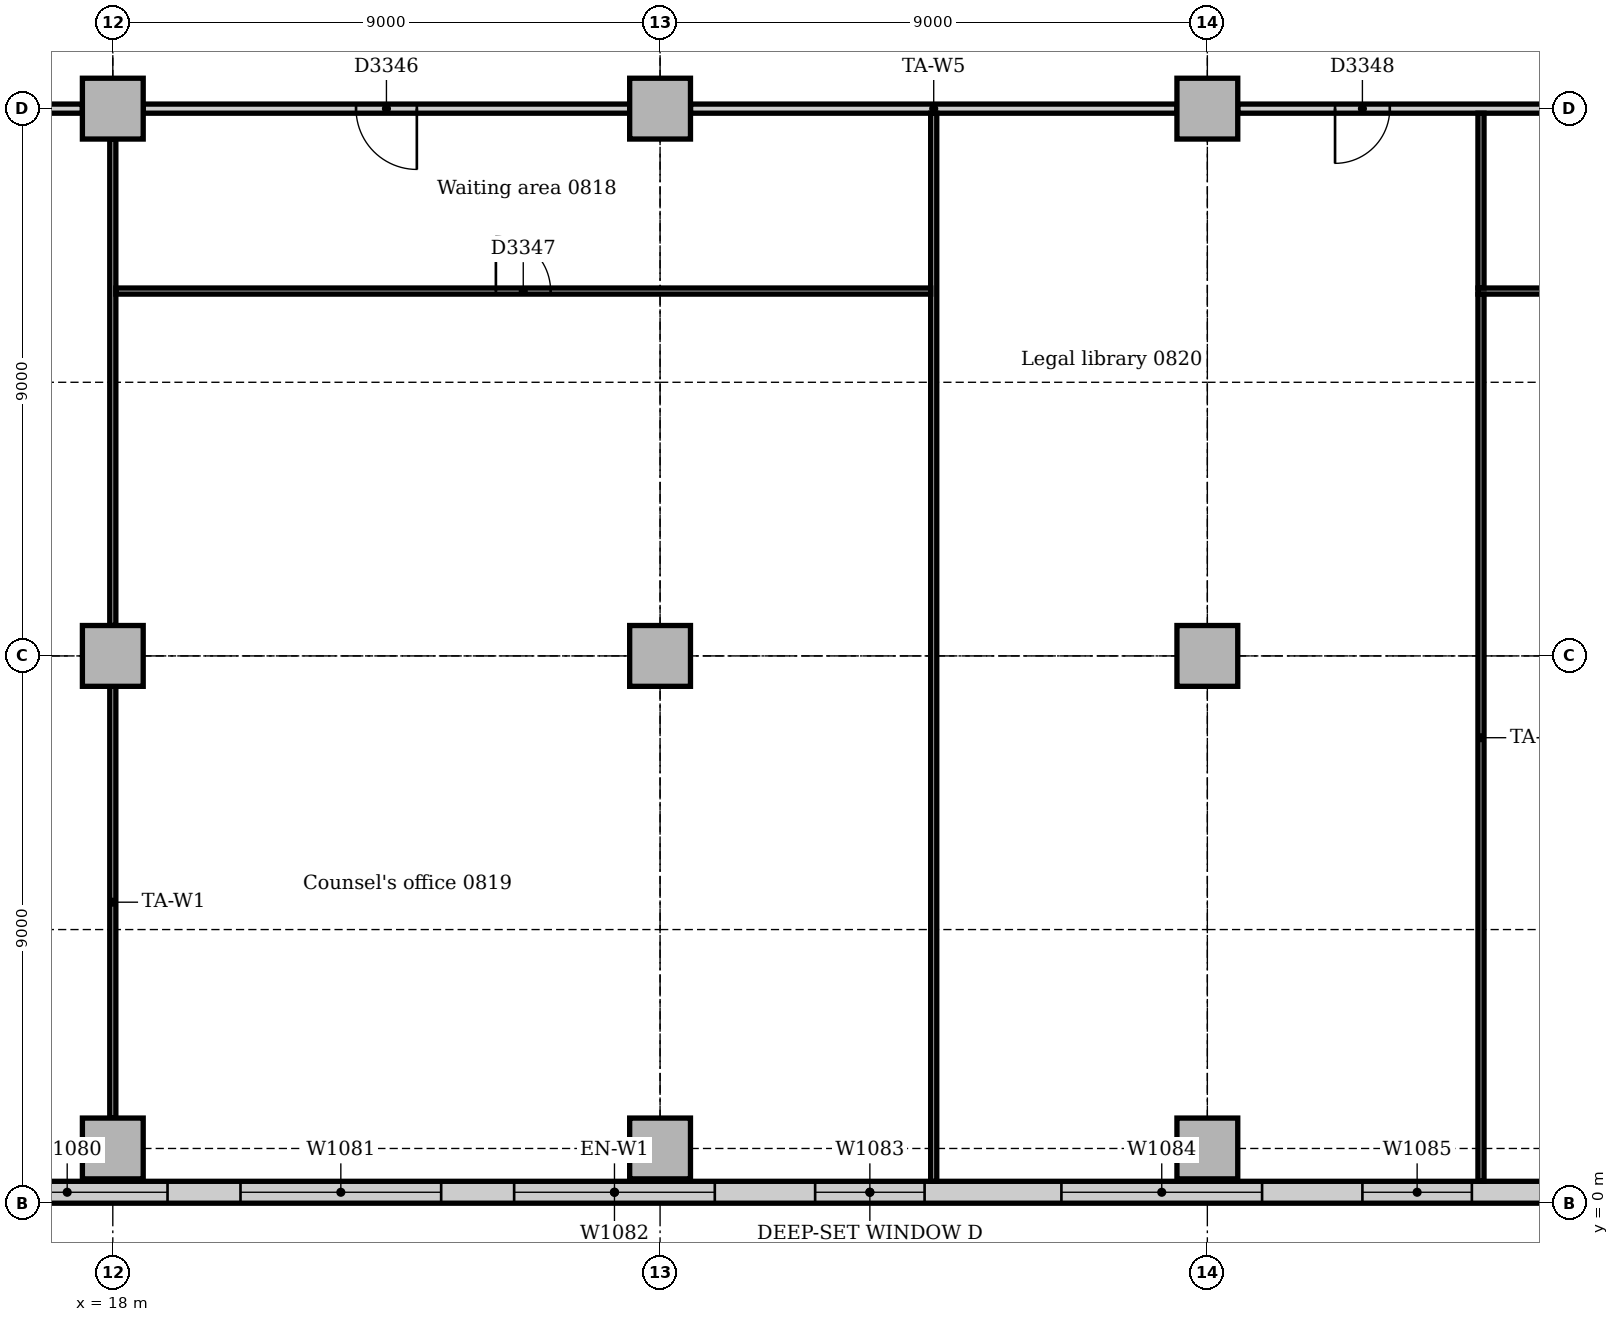
"""IFC4 building model, lengths in metres.
Left out: names, types, materials, properties, quantities, classifications, styles, units other than length and angle.
Written with IfcOpenShell. Run it as: python <this file> out.ifc"""

import sys

from ifc_helpers import new_model, si_unit, direction, frame, frame_2d, origin, origin_2d, place, context, subcontext, project, spatial, rectangle, extrude, element, fill, save


model = new_model("IFC4")
c1 = context("Model", 3, precision=1e-05, world=origin(), true_north=direction((0.0, 1.0)))
c2 = subcontext(c1, "Body", "Model", "MODEL_VIEW")
j1 = project(units=[si_unit("LENGTHUNIT", "METRE"), si_unit("PLANEANGLEUNIT", "RADIAN")], contexts=[c1])
p1 = place(None, origin())
s1 = spatial("IfcSite", under=j1, at=p1, CompositionType="ELEMENT")
p2 = place(p1, origin())
s2 = spatial("IfcBuilding", under=s1, at=p2, CompositionType="ELEMENT")
p3 = place(p2, frame((0.0, 0.0, 38.0)))
s3 = spatial("IfcBuildingStorey", under=s2, at=p3, CompositionType="ELEMENT", Elevation=38.0)
for number, where, z_axis, x_axis in (
    (1, (18.0, 0.9, 0.0), (0.0, 0.0, 1.0), (1.0, 0.0, 0.0)),
    (2, (27.0, 0.9, 0.0), (0.0, 0.0, 1.0), (1.0, 0.0, 0.0)),
    (3, (36.0, 0.9, 0.0), (0.0, 0.0, 1.0), (1.0, 0.0, 0.0)),
    (4, (18.0, 9.0, 0.0), (0.0, 0.0, 1.0), (1.0, 0.0, 0.0)),
    (5, (18.0, 18.0, 0.0), (0.0, 0.0, 1.0), (1.0, 0.0, 0.0)),
    (6, (27.0, 9.0, 0.0), (0.0, 0.0, 1.0), (1.0, 0.0, 0.0)),
    (7, (27.0, 18.0, 0.0), (0.0, 0.0, 1.0), (1.0, 0.0, 0.0)),
    (8, (36.0, 9.0, 0.0), (0.0, 0.0, 1.0), (1.0, 0.0, 0.0)),
    (9, (36.0, 18.0, 0.0), (0.0, 0.0, 1.0), (1.0, 0.0, 0.0)),
):
    element("IfcColumn", number, at=place(p3, frame(where, z_axis=z_axis, x_axis=x_axis)), inside=s3, PredefinedType="COLUMN", context=c2, shape_type="SweptSolid", body=[
        extrude(rectangle(XDim=1.0, YDim=1.0, at=origin_2d()), origin(), (0.0, 0.0, 1.0), 3.85),
    ])
p4 = place(p3, frame((4.243, 0.18, 0.0), z_axis=(0.0, 0.0, 1.0), x_axis=(1.0, 0.0, 0.0)))
e10 = element("IfcWall", 10, at=p4, inside=s3, PredefinedType="STANDARD", context=c2, shape_type="SweptSolid", body=[
    extrude(rectangle(XDim=44.015, YDim=0.36, at=frame_2d((22.007, 0.0))), origin(), (0.0, 0.0, 1.0), 3.85),
])
p5 = place(p4, frame((2.357, 0.0, 0.9)))
e11 = element("IfcOpeningElement", 11, at=p5, cuts=e10, PredefinedType="OPENING", context=c2, shape_type="SweptSolid", body=[
    extrude(rectangle(XDim=3.3, YDim=1.6, at=frame_2d((1.65, 0.8))), frame((0.0, 0.19, 0.0), z_axis=(0.0, -1.0, 0.0), x_axis=(1.0, 0.0, 0.0)), (0.0, 0.0, 1.0), 0.38),
])
p6 = place(p4, frame((6.857, 0.0, 0.9)))
e12 = element("IfcOpeningElement", 12, at=p6, cuts=e10, PredefinedType="OPENING", context=c2, shape_type="SweptSolid", body=[
    extrude(rectangle(XDim=3.3, YDim=1.6, at=frame_2d((1.65, 0.8))), frame((0.0, 0.19, 0.0), z_axis=(0.0, -1.0, 0.0), x_axis=(1.0, 0.0, 0.0)), (0.0, 0.0, 1.0), 0.38),
])
p7 = place(p4, frame((11.357, 0.0, 0.9)))
e13 = element("IfcOpeningElement", 13, at=p7, cuts=e10, PredefinedType="OPENING", context=c2, shape_type="SweptSolid", body=[
    extrude(rectangle(XDim=3.3, YDim=1.6, at=frame_2d((1.65, 0.8))), frame((0.0, 0.19, 0.0), z_axis=(0.0, -1.0, 0.0), x_axis=(1.0, 0.0, 0.0)), (0.0, 0.0, 1.0), 0.38),
])
p8 = place(p4, frame((15.857, 0.0, 0.9)))
e14 = element("IfcOpeningElement", 14, at=p8, cuts=e10, PredefinedType="OPENING", context=c2, shape_type="SweptSolid", body=[
    extrude(rectangle(XDim=3.3, YDim=1.6, at=frame_2d((1.65, 0.8))), frame((0.0, 0.19, 0.0), z_axis=(0.0, -1.0, 0.0), x_axis=(1.0, 0.0, 0.0)), (0.0, 0.0, 1.0), 0.38),
])
p9 = place(p4, frame((20.357, 0.0, 0.9)))
e15 = element("IfcOpeningElement", 15, at=p9, cuts=e10, PredefinedType="OPENING", context=c2, shape_type="SweptSolid", body=[
    extrude(rectangle(XDim=3.3, YDim=1.6, at=frame_2d((1.65, 0.8))), frame((0.0, 0.19, 0.0), z_axis=(0.0, -1.0, 0.0), x_axis=(1.0, 0.0, 0.0)), (0.0, 0.0, 1.0), 0.38),
])
p10 = place(p4, frame((25.307, 0.0, 0.9)))
e16 = element("IfcOpeningElement", 16, at=p10, cuts=e10, PredefinedType="OPENING", context=c2, shape_type="SweptSolid", body=[
    extrude(rectangle(XDim=1.8, YDim=1.6, at=frame_2d((0.9, 0.8))), frame((0.0, 0.19, 0.0), z_axis=(0.0, -1.0, 0.0), x_axis=(1.0, 0.0, 0.0)), (0.0, 0.0, 1.0), 0.38),
])
p11 = place(p4, frame((29.357, 0.0, 0.9)))
e17 = element("IfcOpeningElement", 17, at=p11, cuts=e10, PredefinedType="OPENING", context=c2, shape_type="SweptSolid", body=[
    extrude(rectangle(XDim=3.3, YDim=1.6, at=frame_2d((1.65, 0.8))), frame((0.0, 0.19, 0.0), z_axis=(0.0, -1.0, 0.0), x_axis=(1.0, 0.0, 0.0)), (0.0, 0.0, 1.0), 0.38),
])
p12 = place(p4, frame((34.307, 0.0, 0.9)))
e18 = element("IfcOpeningElement", 18, at=p12, cuts=e10, PredefinedType="OPENING", context=c2, shape_type="SweptSolid", body=[
    extrude(rectangle(XDim=1.8, YDim=1.6, at=frame_2d((0.9, 0.8))), frame((0.0, 0.19, 0.0), z_axis=(0.0, -1.0, 0.0), x_axis=(1.0, 0.0, 0.0)), (0.0, 0.0, 1.0), 0.38),
])
p13 = place(p4, frame((38.357, 0.0, 0.9)))
e19 = element("IfcOpeningElement", 19, at=p13, cuts=e10, PredefinedType="OPENING", context=c2, shape_type="SweptSolid", body=[
    extrude(rectangle(XDim=3.3, YDim=1.6, at=frame_2d((1.65, 0.8))), frame((0.0, 0.19, 0.0), z_axis=(0.0, -1.0, 0.0), x_axis=(1.0, 0.0, 0.0)), (0.0, 0.0, 1.0), 0.38),
])
p14 = place(p3, frame((36.5, 18.0, 0.0), z_axis=(0.0, 0.0, 1.0), x_axis=(1.0, 0.0, 0.0)))
e20 = element("IfcWall", 20, at=p14, inside=s3, PredefinedType="PARTITIONING", context=c2, shape_type="SweptSolid", body=[
    extrude(rectangle(XDim=8.0, YDim=0.15, at=frame_2d((4.0, 0.0))), origin(), (0.0, 0.0, 1.0), 3.15),
])
p15 = place(p14, frame((1.6, 0.0, 0.0)))
e21 = element("IfcOpeningElement", 21, at=p15, cuts=e20, PredefinedType="OPENING", context=c2, shape_type="SweptSolid", body=[
    extrude(rectangle(XDim=0.9, YDim=2.1, at=frame_2d((0.45, 1.05))), frame((0.0, 0.085, 0.0), z_axis=(0.0, -1.0, 0.0), x_axis=(1.0, 0.0, 0.0)), (0.0, 0.0, 1.0), 0.17),
])
p16 = place(p3, frame((27.5, 18.0, 0.0), z_axis=(0.0, 0.0, 1.0), x_axis=(1.0, 0.0, 0.0)))
e22 = element("IfcWall", 22, at=p16, inside=s3, PredefinedType="PARTITIONING", context=c2, shape_type="SweptSolid", body=[
    extrude(rectangle(XDim=8.0, YDim=0.15, at=frame_2d((4.0, 0.0))), origin(), (0.0, 0.0, 1.0), 3.15),
])
p17 = place(p3, frame((18.5, 18.0, 0.0), z_axis=(0.0, 0.0, 1.0), x_axis=(1.0, 0.0, 0.0)))
e23 = element("IfcWall", 23, at=p17, inside=s3, PredefinedType="PARTITIONING", context=c2, shape_type="SweptSolid", body=[
    extrude(rectangle(XDim=8.0, YDim=0.15, at=frame_2d((4.0, 0.0))), origin(), (0.0, 0.0, 1.0), 3.15),
])
p18 = place(p17, frame((3.5, 0.0, 0.0)))
e24 = element("IfcOpeningElement", 24, at=p18, cuts=e23, PredefinedType="OPENING", context=c2, shape_type="SweptSolid", body=[
    extrude(rectangle(XDim=1.0, YDim=2.1, at=frame_2d((0.5, 1.05))), frame((0.0, 0.085, 0.0), z_axis=(0.0, -1.0, 0.0), x_axis=(1.0, 0.0, 0.0)), (0.0, 0.0, 1.0), 0.17),
])
p19 = place(p3, frame((9.5, 18.0, 0.0), z_axis=(0.0, 0.0, 1.0), x_axis=(1.0, 0.0, 0.0)))
e25 = element("IfcWall", 25, at=p19, inside=s3, PredefinedType="PARTITIONING", context=c2, shape_type="SweptSolid", body=[
    extrude(rectangle(XDim=8.0, YDim=0.15, at=frame_2d((4.0, 0.0))), origin(), (0.0, 0.0, 1.0), 3.15),
])
p20 = place(p19, frame((3.55, 0.0, 0.0)))
e26 = element("IfcOpeningElement", 26, at=p20, cuts=e25, PredefinedType="OPENING", context=c2, shape_type="SweptSolid", body=[
    extrude(rectangle(XDim=0.9, YDim=2.1, at=frame_2d((0.45, 1.05))), frame((0.0, 0.085, 0.0), z_axis=(0.0, -1.0, 0.0), x_axis=(1.0, 0.0, 0.0)), (0.0, 0.0, 1.0), 0.17),
])
p21 = place(p3, frame((40.45, 15.0, 0.0), z_axis=(0.0, 0.0, 1.0), x_axis=(1.0, 0.0, 0.0)))
e27 = element("IfcWall", 27, at=p21, inside=s3, PredefinedType="PARTITIONING", context=c2, shape_type="SweptSolid", body=[
    extrude(rectangle(XDim=17.69, YDim=0.1, at=frame_2d((8.845, 0.0))), origin(), (0.0, 0.0, 1.0), 3.85),
])
p22 = place(p21, frame((8.4, 0.0, 0.0)))
e28 = element("IfcOpeningElement", 28, at=p22, cuts=e27, PredefinedType="OPENING", context=c2, shape_type="SweptSolid", body=[
    extrude(rectangle(XDim=0.9, YDim=2.1, at=frame_2d((0.45, 1.05))), frame((0.0, 0.06, 0.0), z_axis=(0.0, -1.0, 0.0), x_axis=(1.0, 0.0, 0.0)), (0.0, 0.0, 1.0), 0.12),
])
p23 = place(p3, frame((18.0, 1.4, 0.0), z_axis=(0.0, 0.0, 1.0), x_axis=(0.0, 1.0, 0.0)))
e29 = element("IfcWall", 29, at=p23, inside=s3, PredefinedType="PARTITIONING", context=c2, shape_type="SweptSolid", body=[
    extrude(rectangle(XDim=7.1, YDim=0.1, at=frame_2d((3.55, 0.0))), origin(), (0.0, 0.0, 1.0), 3.158),
])
p24 = place(p3, frame((18.0, 9.5, 0.0), z_axis=(0.0, 0.0, 1.0), x_axis=(0.0, 1.0, 0.0)))
e30 = element("IfcWall", 30, at=p24, inside=s3, PredefinedType="PARTITIONING", context=c2, shape_type="SweptSolid", body=[
    extrude(rectangle(XDim=8.0, YDim=0.1, at=frame_2d((4.0, 0.0))), origin(), (0.0, 0.0, 1.0), 3.158),
])
p25 = place(p3, frame((31.5, 0.36, 0.0), z_axis=(0.0, 0.0, 1.0), x_axis=(0.0, 1.0, 0.0)))
e31 = element("IfcWall", 31, at=p25, inside=s3, PredefinedType="PARTITIONING", context=c2, shape_type="SweptSolid", body=[
    extrude(rectangle(XDim=17.565, YDim=0.1, at=frame_2d((8.783, 0.0))), origin(), (0.0, 0.0, 1.0), 3.85),
])
p26 = place(p3, frame((40.5, 15.05, 0.0), z_axis=(0.0, 0.0, 1.0), x_axis=(0.0, 1.0, 0.0)))
e32 = element("IfcWall", 32, at=p26, inside=s3, PredefinedType="PARTITIONING", context=c2, shape_type="SweptSolid", body=[
    extrude(rectangle(XDim=2.875, YDim=0.1, at=frame_2d((1.438, 0.0))), origin(), (0.0, 0.0, 1.0), 3.85),
])
p27 = place(p3, frame((40.5, 0.36, 0.0), z_axis=(0.0, 0.0, 1.0), x_axis=(0.0, 1.0, 0.0)))
e33 = element("IfcWall", 33, at=p27, inside=s3, PredefinedType="PARTITIONING", context=c2, shape_type="SweptSolid", body=[
    extrude(rectangle(XDim=14.59, YDim=0.1, at=frame_2d((7.295, 0.0))), origin(), (0.0, 0.0, 1.0), 3.85),
])
p28 = place(p3, frame((18.05, 15.0, 0.0), z_axis=(0.0, 0.0, 1.0), x_axis=(1.0, 0.0, 0.0)))
e34 = element("IfcWall", 34, at=p28, inside=s3, PredefinedType="PARTITIONING", context=c2, shape_type="SweptSolid", body=[
    extrude(rectangle(XDim=13.4, YDim=0.1, at=frame_2d((6.7, 0.0))), origin(), (0.0, 0.0, 1.0), 3.85),
])
p29 = place(p28, frame((6.25, 0.0, 0.0)))
e35 = element("IfcOpeningElement", 35, at=p29, cuts=e34, PredefinedType="OPENING", context=c2, shape_type="SweptSolid", body=[
    extrude(rectangle(XDim=0.9, YDim=2.1, at=frame_2d((0.45, 1.05))), frame((0.0, 0.06, 0.0), z_axis=(0.0, -1.0, 0.0), x_axis=(1.0, 0.0, 0.0)), (0.0, 0.0, 1.0), 0.12),
])
p30 = place(p7, origin())
e36 = element("IfcWindow", 36, at=p30, inside=s3, PartitioningType="SINGLE_PANEL", PredefinedType="WINDOW", context=c2, shape_type="SweptSolid", body=[
    extrude(rectangle(XDim=3.3, YDim=1.6, at=frame_2d((1.65, 0.8))), frame((0.0, 0.13, 0.0), z_axis=(0.0, -1.0, 0.0), x_axis=(1.0, 0.0, 0.0)), (0.0, 0.0, 1.0), 0.06),
])
fill(e13, e36)
p31 = place(p8, origin())
e37 = element("IfcWindow", 37, at=p31, inside=s3, PartitioningType="SINGLE_PANEL", PredefinedType="WINDOW", context=c2, shape_type="SweptSolid", body=[
    extrude(rectangle(XDim=3.3, YDim=1.6, at=frame_2d((1.65, 0.8))), frame((0.0, 0.13, 0.0), z_axis=(0.0, -1.0, 0.0), x_axis=(1.0, 0.0, 0.0)), (0.0, 0.0, 1.0), 0.06),
])
fill(e14, e37)
p32 = place(p9, origin())
e38 = element("IfcWindow", 38, at=p32, inside=s3, PartitioningType="SINGLE_PANEL", PredefinedType="WINDOW", context=c2, shape_type="SweptSolid", body=[
    extrude(rectangle(XDim=3.3, YDim=1.6, at=frame_2d((1.65, 0.8))), frame((0.0, 0.13, 0.0), z_axis=(0.0, -1.0, 0.0), x_axis=(1.0, 0.0, 0.0)), (0.0, 0.0, 1.0), 0.06),
])
fill(e15, e38)
p33 = place(p10, origin())
e39 = element("IfcWindow", 39, at=p33, inside=s3, PartitioningType="SINGLE_PANEL", PredefinedType="WINDOW", context=c2, shape_type="SweptSolid", body=[
    extrude(rectangle(XDim=1.8, YDim=1.6, at=frame_2d((0.9, 0.8))), frame((0.0, 0.13, 0.0), z_axis=(0.0, -1.0, 0.0), x_axis=(1.0, 0.0, 0.0)), (0.0, 0.0, 1.0), 0.06),
])
fill(e16, e39)
p34 = place(p11, origin())
e40 = element("IfcWindow", 40, at=p34, inside=s3, PartitioningType="SINGLE_PANEL", PredefinedType="WINDOW", context=c2, shape_type="SweptSolid", body=[
    extrude(rectangle(XDim=3.3, YDim=1.6, at=frame_2d((1.65, 0.8))), frame((0.0, 0.13, 0.0), z_axis=(0.0, -1.0, 0.0), x_axis=(1.0, 0.0, 0.0)), (0.0, 0.0, 1.0), 0.06),
])
fill(e17, e40)
p35 = place(p12, origin())
e41 = element("IfcWindow", 41, at=p35, inside=s3, PartitioningType="SINGLE_PANEL", PredefinedType="WINDOW", context=c2, shape_type="SweptSolid", body=[
    extrude(rectangle(XDim=1.8, YDim=1.6, at=frame_2d((0.9, 0.8))), frame((0.0, 0.13, 0.0), z_axis=(0.0, -1.0, 0.0), x_axis=(1.0, 0.0, 0.0)), (0.0, 0.0, 1.0), 0.06),
])
fill(e18, e41)
p36 = place(p18, frame((1.0, 0.0, 0.0), z_axis=(0.0, 0.0, 1.0), x_axis=(-1.0, 0.0, 0.0)))
e42 = element("IfcDoor", 42, at=p36, inside=s3, OperationType="SINGLE_SWING_LEFT", PredefinedType="DOOR", context=c2, shape_type="SweptSolid", body=[
    extrude(rectangle(XDim=1.0, YDim=2.1, at=frame_2d((0.5, 1.05))), frame((0.0, 0.025, 0.0), z_axis=(0.0, -1.0, 0.0), x_axis=(1.0, 0.0, 0.0)), (0.0, 0.0, 1.0), 0.05),
])
fill(e24, e42)
p37 = place(p29, origin())
e43 = element("IfcDoor", 43, at=p37, inside=s3, OperationType="SINGLE_SWING_LEFT", PredefinedType="DOOR", context=c2, shape_type="SweptSolid", body=[
    extrude(rectangle(XDim=0.9, YDim=2.1, at=frame_2d((0.45, 1.05))), frame((0.0, 0.025, 0.0), z_axis=(0.0, -1.0, 0.0), x_axis=(1.0, 0.0, 0.0)), (0.0, 0.0, 1.0), 0.05),
])
fill(e35, e43)
p38 = place(p15, frame((0.9, 0.0, 0.0), z_axis=(0.0, 0.0, 1.0), x_axis=(-1.0, 0.0, 0.0)))
e44 = element("IfcDoor", 44, at=p38, inside=s3, OperationType="SINGLE_SWING_RIGHT", PredefinedType="DOOR", context=c2, shape_type="SweptSolid", body=[
    extrude(rectangle(XDim=0.9, YDim=2.1, at=frame_2d((0.45, 1.05))), frame((0.0, 0.025, 0.0), z_axis=(0.0, -1.0, 0.0), x_axis=(1.0, 0.0, 0.0)), (0.0, 0.0, 1.0), 0.05),
])
fill(e21, e44)
save(model, sys.argv[1])
